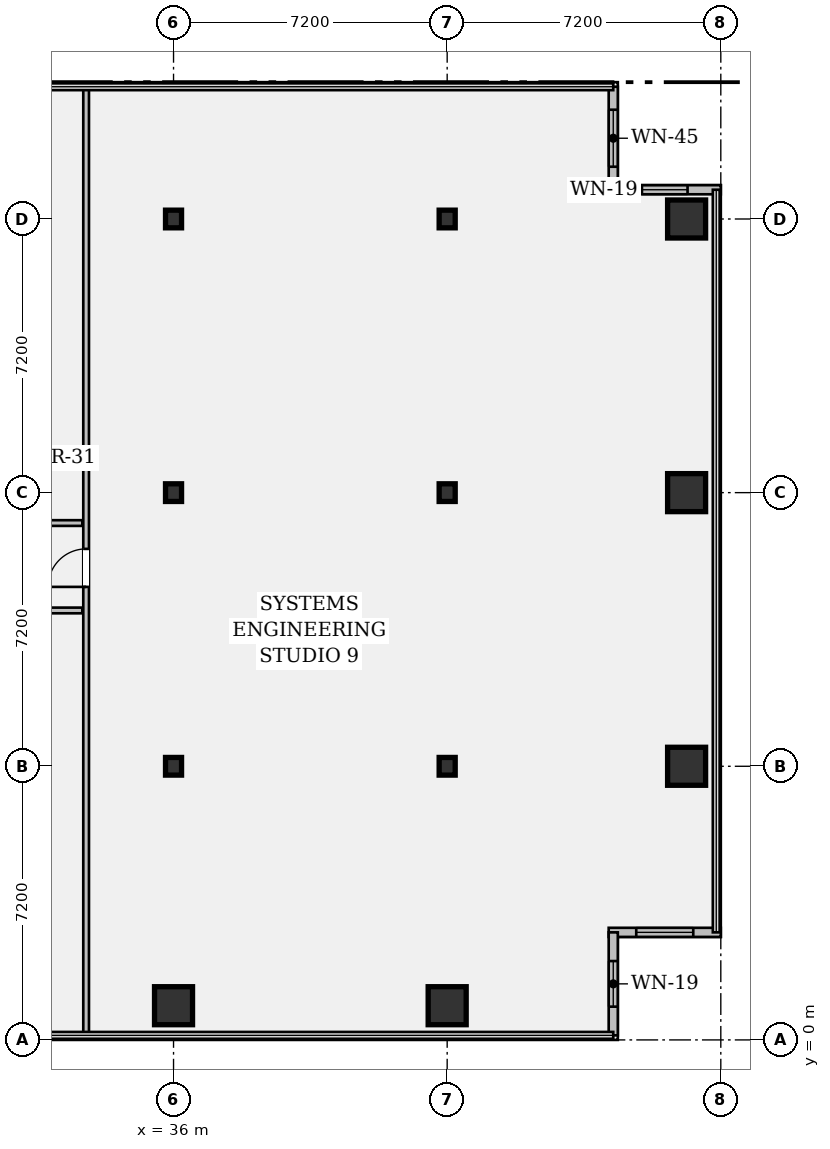
"""IFC4 building model, lengths in metres.
Left out: names, types, materials, properties, quantities, classifications, styles, units other than length and angle.
Written with IfcOpenShell. Run it as: python <this file> out.ifc"""

import sys

from ifc_helpers import new_model, si_unit, direction, frame, frame_2d, origin, origin_2d, place, context, subcontext, project, spatial, rectangle, hollow_rectangle, i_section, extrude, element, fill, save


model = new_model("IFC4")
c1 = context("Model", 3, precision=1e-05, world=origin(), true_north=direction((0.0, 1.0)))
c2 = subcontext(c1, "Body", "Model", "MODEL_VIEW")
j1 = project(units=[si_unit("LENGTHUNIT", "METRE"), si_unit("PLANEANGLEUNIT", "RADIAN")], contexts=[c1])
p1 = place(None, origin())
s1 = spatial("IfcSite", under=j1, at=p1, CompositionType="ELEMENT")
p2 = place(p1, origin())
s2 = spatial("IfcBuilding", under=s1, at=p2, CompositionType="ELEMENT")
p3 = place(p2, frame((0.0, 0.0, 65.8)))
s3 = spatial("IfcBuildingStorey", under=s2, at=p3, CompositionType="ELEMENT", Elevation=65.8)
p4 = place(p3, frame((36.0, 0.9, 0.0), z_axis=(0.0, 0.0, 1.0), x_axis=(1.0, 0.0, 0.0)))
e1 = element("IfcColumn", 1, at=p4, inside=s3, PredefinedType="COLUMN", context=c2, shape_type="SweptSolid", body=[
    extrude(hollow_rectangle(XDim=1.0, YDim=1.0, WallThickness=0.065, at=origin_2d()), origin(), (0.0, 0.0, 1.0), 3.57),
])
for number, where, z_axis, x_axis in (
    (2, (36.0, 7.2, 0.0), (0.0, 0.0, 1.0), (1.0, 0.0, 0.0)),
    (3, (36.0, 14.4, 0.0), (0.0, 0.0, 1.0), (1.0, 0.0, 0.0)),
    (4, (36.0, 21.6, 0.0), (0.0, 0.0, 1.0), (1.0, 0.0, 0.0)),
):
    element("IfcColumn", number, at=place(p3, frame(where, z_axis=z_axis, x_axis=x_axis)), inside=s3, PredefinedType="COLUMN", context=c2, shape_type="SweptSolid", body=[
        extrude(i_section(OverallWidth=0.422, OverallDepth=0.465, WebThickness=0.045, FlangeThickness=0.073, FilletRadius=0.018, at=origin_2d()), origin(), (0.0, 0.0, 1.0), 3.57),
    ])
p5 = place(p3, frame((43.2, 0.9, 0.0), z_axis=(0.0, 0.0, 1.0), x_axis=(1.0, 0.0, 0.0)))
e5 = element("IfcColumn", 5, at=p5, inside=s3, PredefinedType="COLUMN", context=c2, shape_type="SweptSolid", body=[
    extrude(hollow_rectangle(XDim=1.0, YDim=1.0, WallThickness=0.065, at=origin_2d()), origin(), (0.0, 0.0, 1.0), 3.57),
])
for number, where, z_axis, x_axis in (
    (6, (43.2, 7.2, 0.0), (0.0, 0.0, 1.0), (1.0, 0.0, 0.0)),
    (7, (43.2, 14.4, 0.0), (0.0, 0.0, 1.0), (1.0, 0.0, 0.0)),
    (8, (43.2, 21.6, 0.0), (0.0, 0.0, 1.0), (1.0, 0.0, 0.0)),
):
    element("IfcColumn", number, at=place(p3, frame(where, z_axis=z_axis, x_axis=x_axis)), inside=s3, PredefinedType="COLUMN", context=c2, shape_type="SweptSolid", body=[
        extrude(i_section(OverallWidth=0.422, OverallDepth=0.465, WebThickness=0.045, FlangeThickness=0.073, FilletRadius=0.018, at=origin_2d()), origin(), (0.0, 0.0, 1.0), 3.57),
    ])
for number, where, z_axis, x_axis in (
    (9, (49.5, 7.2, 0.0), (0.0, 0.0, 1.0), (1.0, 0.0, 0.0)),
    (10, (49.5, 14.4, 0.0), (0.0, 0.0, 1.0), (1.0, 0.0, 0.0)),
    (11, (49.5, 21.6, 0.0), (0.0, 0.0, 1.0), (1.0, 0.0, 0.0)),
):
    element("IfcColumn", number, at=place(p3, frame(where, z_axis=z_axis, x_axis=x_axis)), inside=s3, PredefinedType="COLUMN", context=c2, shape_type="SweptSolid", body=[
        extrude(hollow_rectangle(XDim=1.0, YDim=1.0, WallThickness=0.065, at=origin_2d()), origin(), (0.0, 0.0, 1.0), 3.57),
    ])
p6 = place(p3, frame((47.57, 25.08, 0.0), z_axis=(0.0, 0.0, 1.0), x_axis=(0.0, -1.0, 0.0)))
e12 = element("IfcWall", 12, at=p6, inside=s3, PredefinedType="STANDARD", context=c2, shape_type="SweptSolid", body=[
    extrude(rectangle(XDim=2.71, YDim=0.24, at=frame_2d((1.355, 0.0))), origin(), (0.0, 0.0, 1.0), 3.57),
])
p7 = place(p6, frame((0.605, 0.0, 0.95)))
e13 = element("IfcOpeningElement", 13, at=p7, cuts=e12, PredefinedType="OPENING", context=c2, shape_type="SweptSolid", body=[
    extrude(rectangle(XDim=1.5, YDim=1.8, at=frame_2d((0.75, 0.9))), frame((0.0, 0.132, 0.0), z_axis=(0.0, -1.0, 0.0), x_axis=(1.0, 0.0, 0.0)), (0.0, 0.0, 1.0), 0.264),
])
p8 = place(p3, frame((47.45, 22.37, 0.0), z_axis=(0.0, 0.0, 1.0), x_axis=(1.0, 0.0, 0.0)))
e14 = element("IfcWall", 14, at=p8, inside=s3, PredefinedType="STANDARD", context=c2, shape_type="SweptSolid", body=[
    extrude(rectangle(XDim=2.95, YDim=0.24, at=frame_2d((1.475, 0.0))), origin(), (0.0, 0.0, 1.0), 3.57),
])
p9 = place(p8, frame((0.875, 0.0, 0.95)))
e15 = element("IfcOpeningElement", 15, at=p9, cuts=e14, PredefinedType="OPENING", context=c2, shape_type="SweptSolid", body=[
    extrude(rectangle(XDim=1.2, YDim=1.8, at=frame_2d((0.6, 0.9))), frame((0.0, 0.132, 0.0), z_axis=(0.0, -1.0, 0.0), x_axis=(1.0, 0.0, 0.0)), (0.0, 0.0, 1.0), 0.264),
])
p10 = place(p3, frame((50.4, 2.83, 0.0), z_axis=(0.0, 0.0, 1.0), x_axis=(-1.0, 0.0, 0.0)))
e16 = element("IfcWall", 16, at=p10, inside=s3, PredefinedType="STANDARD", context=c2, shape_type="SweptSolid", body=[
    extrude(rectangle(XDim=2.95, YDim=0.24, at=frame_2d((1.475, 0.0))), origin(), (0.0, 0.0, 1.0), 3.57),
])
p11 = place(p10, frame((0.725, 0.0, 0.95)))
e17 = element("IfcOpeningElement", 17, at=p11, cuts=e16, PredefinedType="OPENING", context=c2, shape_type="SweptSolid", body=[
    extrude(rectangle(XDim=1.5, YDim=1.8, at=frame_2d((0.75, 0.9))), frame((0.0, 0.132, 0.0), z_axis=(0.0, -1.0, 0.0), x_axis=(1.0, 0.0, 0.0)), (0.0, 0.0, 1.0), 0.264),
])
p12 = place(p3, frame((47.57, 2.83, 0.0), z_axis=(0.0, 0.0, 1.0), x_axis=(0.0, -1.0, 0.0)))
e18 = element("IfcWall", 18, at=p12, inside=s3, PredefinedType="STANDARD", context=c2, shape_type="SweptSolid", body=[
    extrude(rectangle(XDim=2.71, YDim=0.24, at=frame_2d((1.355, 0.0))), origin(), (0.0, 0.0, 1.0), 3.57),
])
p13 = place(p12, frame((0.755, 0.0, 0.95)))
e19 = element("IfcOpeningElement", 19, at=p13, cuts=e18, PredefinedType="OPENING", context=c2, shape_type="SweptSolid", body=[
    extrude(rectangle(XDim=1.2, YDim=1.8, at=frame_2d((0.6, 0.9))), frame((0.0, 0.132, 0.0), z_axis=(0.0, -1.0, 0.0), x_axis=(1.0, 0.0, 0.0)), (0.0, 0.0, 1.0), 0.264),
])
p14 = place(p3, frame((17.35, 11.3, 0.0), z_axis=(0.0, 0.0, 1.0), x_axis=(1.0, 0.0, 0.0)))
e20 = element("IfcWall", 20, at=p14, inside=s3, PredefinedType="PARTITIONING", context=c2, shape_type="SweptSolid", body=[
    extrude(rectangle(XDim=16.25, YDim=0.15, at=frame_2d((8.125, 0.0))), origin(), (0.0, 0.0, 1.0), 2.699),
])
p15 = place(p14, frame((3.73, 0.0, 0.0)))
e21 = element("IfcOpeningElement", 21, at=p15, cuts=e20, PredefinedType="OPENING", context=c2, shape_type="SweptSolid", body=[
    extrude(rectangle(XDim=0.95, YDim=2.15, at=frame_2d((0.475, 1.075))), frame((0.0, 0.087, 0.0), z_axis=(0.0, -1.0, 0.0), x_axis=(1.0, 0.0, 0.0)), (0.0, 0.0, 1.0), 0.174),
])
p16 = place(p14, frame((11.85, 0.0, 0.0)))
e22 = element("IfcOpeningElement", 22, at=p16, cuts=e20, PredefinedType="OPENING", context=c2, shape_type="SweptSolid", body=[
    extrude(rectangle(XDim=0.95, YDim=2.15, at=frame_2d((0.475, 1.075))), frame((0.0, 0.087, 0.0), z_axis=(0.0, -1.0, 0.0), x_axis=(1.0, 0.0, 0.0)), (0.0, 0.0, 1.0), 0.174),
])
p17 = place(p3, frame((17.35, 13.6, 0.0), z_axis=(0.0, 0.0, 1.0), x_axis=(1.0, 0.0, 0.0)))
e23 = element("IfcWall", 23, at=p17, inside=s3, PredefinedType="PARTITIONING", context=c2, shape_type="SweptSolid", body=[
    extrude(rectangle(XDim=16.25, YDim=0.15, at=frame_2d((8.125, 0.0))), origin(), (0.0, 0.0, 1.0), 2.699),
])
p18 = place(p17, frame((0.7, 0.0, 0.0)))
e24 = element("IfcOpeningElement", 24, at=p18, cuts=e23, PredefinedType="OPENING", context=c2, shape_type="SweptSolid", body=[
    extrude(rectangle(XDim=0.85, YDim=2.15, at=frame_2d((0.425, 1.075))), frame((0.0, 0.087, 0.0), z_axis=(0.0, -1.0, 0.0), x_axis=(1.0, 0.0, 0.0)), (0.0, 0.0, 1.0), 0.174),
])
p19 = place(p17, frame((4.75, 0.0, 0.0)))
e25 = element("IfcOpeningElement", 25, at=p19, cuts=e23, PredefinedType="OPENING", context=c2, shape_type="SweptSolid", body=[
    extrude(rectangle(XDim=0.85, YDim=2.15, at=frame_2d((0.425, 1.075))), frame((0.0, 0.087, 0.0), z_axis=(0.0, -1.0, 0.0), x_axis=(1.0, 0.0, 0.0)), (0.0, 0.0, 1.0), 0.174),
])
p20 = place(p17, frame((6.46, 0.0, 0.0)))
e26 = element("IfcOpeningElement", 26, at=p20, cuts=e23, PredefinedType="OPENING", context=c2, shape_type="SweptSolid", body=[
    extrude(rectangle(XDim=0.85, YDim=2.15, at=frame_2d((0.425, 1.075))), frame((0.0, 0.087, 0.0), z_axis=(0.0, -1.0, 0.0), x_axis=(1.0, 0.0, 0.0)), (0.0, 0.0, 1.0), 0.174),
])
p21 = place(p17, frame((9.34, 0.0, 0.0)))
e27 = element("IfcOpeningElement", 27, at=p21, cuts=e23, PredefinedType="OPENING", context=c2, shape_type="SweptSolid", body=[
    extrude(rectangle(XDim=0.95, YDim=2.15, at=frame_2d((0.475, 1.075))), frame((0.0, 0.087, 0.0), z_axis=(0.0, -1.0, 0.0), x_axis=(1.0, 0.0, 0.0)), (0.0, 0.0, 1.0), 0.174),
])
p22 = place(p3, frame((33.7, 0.12, 0.0), z_axis=(0.0, 0.0, 1.0), x_axis=(0.0, 1.0, 0.0)))
e28 = element("IfcWall", 28, at=p22, inside=s3, PredefinedType="PARTITIONING", context=c2, shape_type="SweptSolid", body=[
    extrude(rectangle(XDim=24.96, YDim=0.15, at=frame_2d((12.48, 0.0))), origin(), (0.0, 0.0, 1.0), 2.699),
])
p23 = place(p22, frame((11.8, 0.0, 0.0)))
e29 = element("IfcOpeningElement", 29, at=p23, cuts=e28, PredefinedType="OPENING", context=c2, shape_type="SweptSolid", body=[
    extrude(rectangle(XDim=1.0, YDim=2.15, at=frame_2d((0.5, 1.075))), frame((0.0, 0.087, 0.0), z_axis=(0.0, -1.0, 0.0), x_axis=(1.0, 0.0, 0.0)), (0.0, 0.0, 1.0), 0.174),
])
p24 = place(p7, origin())
e30 = element("IfcWindow", 30, at=p24, inside=s3, PartitioningType="SINGLE_PANEL", PredefinedType="WINDOW", context=c2, shape_type="SweptSolid", body=[
    extrude(rectangle(XDim=1.5, YDim=1.8, at=frame_2d((0.75, 0.9))), frame((0.0, 0.03, 0.0), z_axis=(0.0, -1.0, 0.0), x_axis=(1.0, 0.0, 0.0)), (0.0, 0.0, 1.0), 0.06),
])
fill(e13, e30)
p25 = place(p9, origin())
e31 = element("IfcWindow", 31, at=p25, inside=s3, PartitioningType="SINGLE_PANEL", PredefinedType="WINDOW", context=c2, shape_type="SweptSolid", body=[
    extrude(rectangle(XDim=1.2, YDim=1.8, at=frame_2d((0.6, 0.9))), frame((0.0, 0.03, 0.0), z_axis=(0.0, -1.0, 0.0), x_axis=(1.0, 0.0, 0.0)), (0.0, 0.0, 1.0), 0.06),
])
fill(e15, e31)
p26 = place(p11, origin())
e32 = element("IfcWindow", 32, at=p26, inside=s3, PartitioningType="SINGLE_PANEL", PredefinedType="WINDOW", context=c2, shape_type="SweptSolid", body=[
    extrude(rectangle(XDim=1.5, YDim=1.8, at=frame_2d((0.75, 0.9))), frame((0.0, 0.03, 0.0), z_axis=(0.0, -1.0, 0.0), x_axis=(1.0, 0.0, 0.0)), (0.0, 0.0, 1.0), 0.06),
])
fill(e17, e32)
p27 = place(p13, origin())
e33 = element("IfcWindow", 33, at=p27, inside=s3, PartitioningType="SINGLE_PANEL", PredefinedType="WINDOW", context=c2, shape_type="SweptSolid", body=[
    extrude(rectangle(XDim=1.2, YDim=1.8, at=frame_2d((0.6, 0.9))), frame((0.0, 0.03, 0.0), z_axis=(0.0, -1.0, 0.0), x_axis=(1.0, 0.0, 0.0)), (0.0, 0.0, 1.0), 0.06),
])
fill(e19, e33)
p28 = place(p23, origin())
e34 = element("IfcDoor", 34, at=p28, inside=s3, OperationType="SINGLE_SWING_LEFT", PredefinedType="DOOR", context=c2, shape_type="SweptSolid", body=[
    extrude(rectangle(XDim=1.0, YDim=2.15, at=frame_2d((0.5, 1.075))), frame((0.0, 0.025, 0.0), z_axis=(0.0, -1.0, 0.0), x_axis=(1.0, 0.0, 0.0)), (0.0, 0.0, 1.0), 0.05),
])
fill(e29, e34)
save(model, sys.argv[1])
